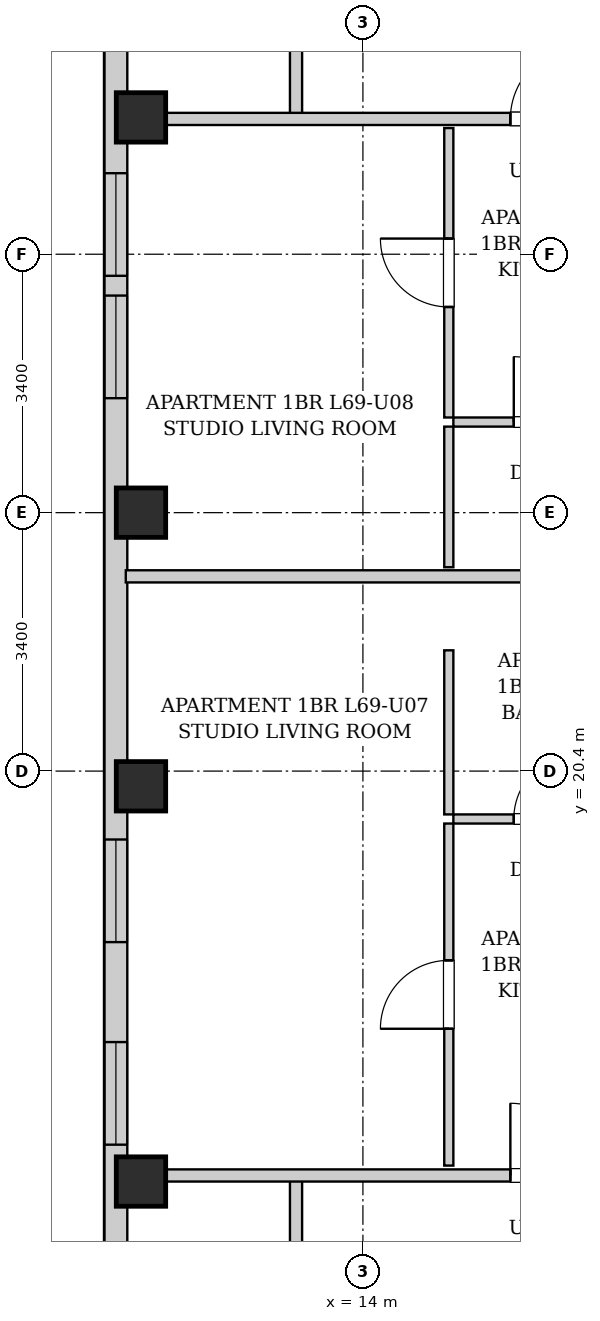
"""IFC4 building model, lengths in metres.
Left out: names, types, materials, properties, quantities, classifications, styles, units other than length and angle.
Written with IfcOpenShell. Run it as: python <this file> out.ifc"""

import sys

from ifc_helpers import new_model, si_unit, direction, frame, frame_2d, origin, origin_2d, place, context, subcontext, project, spatial, rectangle, extrude, element, fill, save


model = new_model("IFC4")
c1 = context("Model", 3, precision=1e-05, world=origin(), true_north=direction((0.0, 1.0)))
c2 = subcontext(c1, "Body", "Model", "MODEL_VIEW")
j1 = project(units=[si_unit("LENGTHUNIT", "METRE"), si_unit("PLANEANGLEUNIT", "RADIAN")], contexts=[c1])
p1 = place(None, origin())
s1 = spatial("IfcSite", under=j1, at=p1, CompositionType="ELEMENT")
p2 = place(p1, origin())
s2 = spatial("IfcBuilding", under=s1, at=p2, CompositionType="ELEMENT")
p3 = place(p2, frame((0.0, 0.0, 237.7)))
s3 = spatial("IfcBuildingStorey", under=s2, at=p3, CompositionType="ELEMENT", Elevation=237.7)
for number, where, z_axis, x_axis in (
    (1, (11.08, 15.0, 0.0), (0.0, 0.0, 1.0), (1.0, 0.0, 0.0)),
    (2, (11.08, 20.2, 0.0), (0.0, 0.0, 1.0), (1.0, 0.0, 0.0)),
    (3, (11.08, 23.8, 0.0), (0.0, 0.0, 1.0), (1.0, 0.0, 0.0)),
    (4, (11.08, 29.0, 0.0), (0.0, 0.0, 1.0), (1.0, 0.0, 0.0)),
):
    element("IfcColumn", number, at=place(p3, frame(where, z_axis=z_axis, x_axis=x_axis)), inside=s3, PredefinedType="COLUMN", context=c2, shape_type="SweptSolid", body=[
        extrude(rectangle(XDim=0.65, YDim=0.65, at=origin_2d()), origin(), (0.0, 0.0, 1.0), 3.4),
    ])
p4 = place(p3, frame((10.75, 6.3, 0.0), z_axis=(0.0, 0.0, 1.0), x_axis=(0.0, 1.0, 0.0)))
e5 = element("IfcWall", 5, at=p4, inside=s3, PredefinedType="SOLIDWALL", context=c2, shape_type="SweptSolid", body=[
    extrude(rectangle(XDim=31.4, YDim=0.3, at=frame_2d((15.7, 0.0))), origin(), (0.0, 0.0, 1.0), 3.14),
])
p5 = place(p4, frame((28.546, 0.0, 0.55)))
e6 = element("IfcOpeningElement", 6, at=p5, cuts=e5, PredefinedType="OPENING", context=c2, shape_type="SweptSolid", body=[
    extrude(rectangle(XDim=1.35, YDim=1.2, at=frame_2d((0.675, 0.6))), frame((0.0, 0.16, 0.0), z_axis=(0.0, -1.0, 0.0), x_axis=(1.0, 0.0, 0.0)), (0.0, 0.0, 1.0), 0.32),
])
p6 = place(p4, frame((11.85, 0.0, 0.55)))
e7 = element("IfcOpeningElement", 7, at=p6, cuts=e5, PredefinedType="OPENING", context=c2, shape_type="SweptSolid", body=[
    extrude(rectangle(XDim=1.35, YDim=1.2, at=frame_2d((0.675, 0.6))), frame((0.0, 0.16, 0.0), z_axis=(0.0, -1.0, 0.0), x_axis=(1.0, 0.0, 0.0)), (0.0, 0.0, 1.0), 0.32),
])
p7 = place(p4, frame((9.185, 0.0, 0.55)))
e8 = element("IfcOpeningElement", 8, at=p7, cuts=e5, PredefinedType="OPENING", context=c2, shape_type="SweptSolid", body=[
    extrude(rectangle(XDim=1.35, YDim=1.2, at=frame_2d((0.675, 0.6))), frame((0.0, 0.16, 0.0), z_axis=(0.0, -1.0, 0.0), x_axis=(1.0, 0.0, 0.0)), (0.0, 0.0, 1.0), 0.32),
])
p8 = place(p4, frame((19.006, 0.0, 0.55)))
e9 = element("IfcOpeningElement", 9, at=p8, cuts=e5, PredefinedType="OPENING", context=c2, shape_type="SweptSolid", body=[
    extrude(rectangle(XDim=1.35, YDim=1.2, at=frame_2d((0.675, 0.6))), frame((0.0, 0.16, 0.0), z_axis=(0.0, -1.0, 0.0), x_axis=(1.0, 0.0, 0.0)), (0.0, 0.0, 1.0), 0.32),
])
p9 = place(p4, frame((20.616, 0.0, 0.55)))
e10 = element("IfcOpeningElement", 10, at=p9, cuts=e5, PredefinedType="OPENING", context=c2, shape_type="SweptSolid", body=[
    extrude(rectangle(XDim=1.35, YDim=1.2, at=frame_2d((0.675, 0.6))), frame((0.0, 0.16, 0.0), z_axis=(0.0, -1.0, 0.0), x_axis=(1.0, 0.0, 0.0)), (0.0, 0.0, 1.0), 0.32),
])
for number, where, z_axis, x_axis in (
    (11, (13.12, 13.51, 0.0), (0.0, 0.0, 1.0), (0.0, 1.0, 0.0)),
    (12, (13.12, 28.98, 0.0), (0.0, 0.0, 1.0), (0.0, 1.0, 0.0)),
):
    element("IfcWall", number, at=place(p3, frame(where, z_axis=z_axis, x_axis=x_axis)), inside=s3, PredefinedType="PARTITIONING", context=c2, shape_type="SweptSolid", body=[
        extrude(rectangle(XDim=1.58, YDim=0.16, at=frame_2d((0.79, 0.0))), origin(), (0.0, 0.0, 1.0), 3.14),
    ])
p10 = place(p3, frame((10.88, 15.08, 0.0), z_axis=(0.0, 0.0, 1.0), x_axis=(1.0, 0.0, 0.0)))
e13 = element("IfcWall", 13, at=p10, inside=s3, PredefinedType="PARTITIONING", context=c2, shape_type="SweptSolid", body=[
    extrude(rectangle(XDim=6.88, YDim=0.16, at=frame_2d((3.44, 0.0))), origin(), (0.0, 0.0, 1.0), 2.668),
])
p11 = place(p10, frame((5.06, 0.0, 0.0)))
e14 = element("IfcOpeningElement", 14, at=p11, cuts=e13, PredefinedType="OPENING", context=c2, shape_type="SweptSolid", body=[
    extrude(rectangle(XDim=0.95, YDim=2.1, at=frame_2d((0.475, 1.05))), frame((0.0, 0.09, 0.0), z_axis=(0.0, -1.0, 0.0), x_axis=(1.0, 0.0, 0.0)), (0.0, 0.0, 1.0), 0.18),
])
p12 = place(p3, frame((10.88, 22.962, 0.0), z_axis=(0.0, 0.0, 1.0), x_axis=(1.0, 0.0, 0.0)))
e15 = element("IfcWall", 15, at=p12, inside=s3, PredefinedType="PARTITIONING", context=c2, shape_type="SweptSolid", body=[
    extrude(rectangle(XDim=6.76, YDim=0.16, at=frame_2d((3.38, 0.0))), origin(), (0.0, 0.0, 1.0), 3.14),
])
p13 = place(p3, frame((15.19, 19.77, 0.0), z_axis=(0.0, 0.0, 1.0), x_axis=(1.0, 0.0, 0.0)))
e16 = element("IfcWall", 16, at=p13, inside=s3, PredefinedType="PARTITIONING", context=c2, shape_type="SweptSolid", body=[
    extrude(rectangle(XDim=2.45, YDim=0.12, at=frame_2d((1.225, 0.0))), origin(), (0.0, 0.0, 1.0), 3.14),
])
p14 = place(p13, frame((0.795, 0.0, 0.0)))
e17 = element("IfcOpeningElement", 17, at=p14, cuts=e16, PredefinedType="OPENING", context=c2, shape_type="SweptSolid", body=[
    extrude(rectangle(XDim=0.86, YDim=2.05, at=frame_2d((0.43, 1.025))), frame((0.0, 0.07, 0.0), z_axis=(0.0, -1.0, 0.0), x_axis=(1.0, 0.0, 0.0)), (0.0, 0.0, 1.0), 0.14),
])
p15 = place(p3, frame((15.13, 19.83, 0.0), z_axis=(0.0, 0.0, 1.0), x_axis=(0.0, 1.0, 0.0)))
e18 = element("IfcWall", 18, at=p15, inside=s3, PredefinedType="PARTITIONING", context=c2, shape_type="SweptSolid", body=[
    extrude(rectangle(XDim=2.159, YDim=0.12, at=frame_2d((1.08, 0.0))), origin(), (0.0, 0.0, 1.0), 3.14),
])
p16 = place(p3, frame((15.13, 15.21, 0.0), z_axis=(0.0, 0.0, 1.0), x_axis=(0.0, 1.0, 0.0)))
e19 = element("IfcWall", 19, at=p16, inside=s3, PredefinedType="PARTITIONING", context=c2, shape_type="SweptSolid", body=[
    extrude(rectangle(XDim=4.5, YDim=0.12, at=frame_2d((2.25, 0.0))), origin(), (0.0, 0.0, 1.0), 3.14),
])
p17 = place(p16, frame((1.8, 0.0, 0.0)))
e20 = element("IfcOpeningElement", 20, at=p17, cuts=e19, PredefinedType="OPENING", context=c2, shape_type="SweptSolid", body=[
    extrude(rectangle(XDim=0.9, YDim=2.05, at=frame_2d((0.45, 1.025))), frame((0.0, 0.07, 0.0), z_axis=(0.0, -1.0, 0.0), x_axis=(1.0, 0.0, 0.0)), (0.0, 0.0, 1.0), 0.14),
])
p18 = place(p3, frame((10.88, 28.98, 0.0), z_axis=(0.0, 0.0, 1.0), x_axis=(1.0, 0.0, 0.0)))
e21 = element("IfcWall", 21, at=p18, inside=s3, PredefinedType="PARTITIONING", context=c2, shape_type="SweptSolid", body=[
    extrude(rectangle(XDim=6.88, YDim=0.16, at=frame_2d((3.44, 0.0))), origin(), (0.0, 0.0, 1.0), 2.668),
])
p19 = place(p18, frame((5.06, 0.0, 0.0)))
e22 = element("IfcOpeningElement", 22, at=p19, cuts=e21, PredefinedType="OPENING", context=c2, shape_type="SweptSolid", body=[
    extrude(rectangle(XDim=0.95, YDim=2.1, at=frame_2d((0.475, 1.05))), frame((0.0, 0.09, 0.0), z_axis=(0.0, -1.0, 0.0), x_axis=(1.0, 0.0, 0.0)), (0.0, 0.0, 1.0), 0.18),
])
p20 = place(p3, frame((15.19, 24.992, 0.0), z_axis=(0.0, 0.0, 1.0), x_axis=(1.0, 0.0, 0.0)))
e23 = element("IfcWall", 23, at=p20, inside=s3, PredefinedType="PARTITIONING", context=c2, shape_type="SweptSolid", body=[
    extrude(rectangle(XDim=2.45, YDim=0.12, at=frame_2d((1.225, 0.0))), origin(), (0.0, 0.0, 1.0), 3.14),
])
p21 = place(p20, frame((0.795, 0.0, 0.0)))
e24 = element("IfcOpeningElement", 24, at=p21, cuts=e23, PredefinedType="OPENING", context=c2, shape_type="SweptSolid", body=[
    extrude(rectangle(XDim=0.86, YDim=2.05, at=frame_2d((0.43, 1.025))), frame((0.0, 0.07, 0.0), z_axis=(0.0, -1.0, 0.0), x_axis=(1.0, 0.0, 0.0)), (0.0, 0.0, 1.0), 0.14),
])
p22 = place(p3, frame((15.13, 23.082, 0.0), z_axis=(0.0, 0.0, 1.0), x_axis=(0.0, 1.0, 0.0)))
e25 = element("IfcWall", 25, at=p22, inside=s3, PredefinedType="PARTITIONING", context=c2, shape_type="SweptSolid", body=[
    extrude(rectangle(XDim=1.85, YDim=0.12, at=frame_2d((0.925, 0.0))), origin(), (0.0, 0.0, 1.0), 3.14),
])
p23 = place(p3, frame((15.13, 25.052, 0.0), z_axis=(0.0, 0.0, 1.0), x_axis=(0.0, 1.0, 0.0)))
e26 = element("IfcWall", 26, at=p23, inside=s3, PredefinedType="PARTITIONING", context=c2, shape_type="SweptSolid", body=[
    extrude(rectangle(XDim=3.808, YDim=0.12, at=frame_2d((1.904, 0.0))), origin(), (0.0, 0.0, 1.0), 3.14),
])
p24 = place(p23, frame((1.454, 0.0, 0.0)))
e27 = element("IfcOpeningElement", 27, at=p24, cuts=e26, PredefinedType="OPENING", context=c2, shape_type="SweptSolid", body=[
    extrude(rectangle(XDim=0.9, YDim=2.05, at=frame_2d((0.45, 1.025))), frame((0.0, 0.07, 0.0), z_axis=(0.0, -1.0, 0.0), x_axis=(1.0, 0.0, 0.0)), (0.0, 0.0, 1.0), 0.14),
])
p25 = place(p11, origin())
e28 = element("IfcDoor", 28, at=p25, inside=s3, OperationType="SINGLE_SWING_LEFT", PredefinedType="DOOR", context=c2, shape_type="SweptSolid", body=[
    extrude(rectangle(XDim=0.95, YDim=2.1, at=frame_2d((0.475, 1.05))), frame((0.0, 0.025, 0.0), z_axis=(0.0, -1.0, 0.0), x_axis=(1.0, 0.0, 0.0)), (0.0, 0.0, 1.0), 0.05),
])
fill(e14, e28)
p26 = place(p14, origin())
e29 = element("IfcDoor", 29, at=p26, inside=s3, OperationType="SINGLE_SWING_RIGHT", PredefinedType="DOOR", context=c2, shape_type="SweptSolid", body=[
    extrude(rectangle(XDim=0.86, YDim=2.05, at=frame_2d((0.43, 1.025))), frame((0.0, 0.025, 0.0), z_axis=(0.0, -1.0, 0.0), x_axis=(1.0, 0.0, 0.0)), (0.0, 0.0, 1.0), 0.05),
])
fill(e17, e29)
p27 = place(p17, origin())
e30 = element("IfcDoor", 30, at=p27, inside=s3, OperationType="SINGLE_SWING_LEFT", PredefinedType="DOOR", context=c2, shape_type="SweptSolid", body=[
    extrude(rectangle(XDim=0.9, YDim=2.05, at=frame_2d((0.45, 1.025))), frame((0.0, 0.025, 0.0), z_axis=(0.0, -1.0, 0.0), x_axis=(1.0, 0.0, 0.0)), (0.0, 0.0, 1.0), 0.05),
])
fill(e20, e30)
p28 = place(p19, origin())
e31 = element("IfcDoor", 31, at=p28, inside=s3, OperationType="SINGLE_SWING_RIGHT", PredefinedType="DOOR", context=c2, shape_type="SweptSolid", body=[
    extrude(rectangle(XDim=0.95, YDim=2.1, at=frame_2d((0.475, 1.05))), frame((0.0, 0.025, 0.0), z_axis=(0.0, -1.0, 0.0), x_axis=(1.0, 0.0, 0.0)), (0.0, 0.0, 1.0), 0.05),
])
fill(e22, e31)
p29 = place(p21, origin())
e32 = element("IfcDoor", 32, at=p29, inside=s3, OperationType="SINGLE_SWING_LEFT", PredefinedType="DOOR", context=c2, shape_type="SweptSolid", body=[
    extrude(rectangle(XDim=0.86, YDim=2.05, at=frame_2d((0.43, 1.025))), frame((0.0, 0.025, 0.0), z_axis=(0.0, -1.0, 0.0), x_axis=(1.0, 0.0, 0.0)), (0.0, 0.0, 1.0), 0.05),
])
fill(e24, e32)
p30 = place(p24, origin())
e33 = element("IfcDoor", 33, at=p30, inside=s3, OperationType="SINGLE_SWING_RIGHT", PredefinedType="DOOR", context=c2, shape_type="SweptSolid", body=[
    extrude(rectangle(XDim=0.9, YDim=2.05, at=frame_2d((0.45, 1.025))), frame((0.0, 0.025, 0.0), z_axis=(0.0, -1.0, 0.0), x_axis=(1.0, 0.0, 0.0)), (0.0, 0.0, 1.0), 0.05),
])
fill(e27, e33)
p31 = place(p6, origin())
e34 = element("IfcWindow", 34, at=p31, inside=s3, PartitioningType="SINGLE_PANEL", PredefinedType="WINDOW", context=c2, shape_type="SweptSolid", body=[
    extrude(rectangle(XDim=1.35, YDim=1.2, at=frame_2d((0.675, 0.6))), frame((0.0, 0.03, 0.0), z_axis=(0.0, -1.0, 0.0), x_axis=(1.0, 0.0, 0.0)), (0.0, 0.0, 1.0), 0.06),
])
fill(e7, e34)
p32 = place(p7, origin())
e35 = element("IfcWindow", 35, at=p32, inside=s3, PartitioningType="SINGLE_PANEL", PredefinedType="WINDOW", context=c2, shape_type="SweptSolid", body=[
    extrude(rectangle(XDim=1.35, YDim=1.2, at=frame_2d((0.675, 0.6))), frame((0.0, 0.03, 0.0), z_axis=(0.0, -1.0, 0.0), x_axis=(1.0, 0.0, 0.0)), (0.0, 0.0, 1.0), 0.06),
])
fill(e8, e35)
p33 = place(p8, origin())
e36 = element("IfcWindow", 36, at=p33, inside=s3, PartitioningType="SINGLE_PANEL", PredefinedType="WINDOW", context=c2, shape_type="SweptSolid", body=[
    extrude(rectangle(XDim=1.35, YDim=1.2, at=frame_2d((0.675, 0.6))), frame((0.0, 0.03, 0.0), z_axis=(0.0, -1.0, 0.0), x_axis=(1.0, 0.0, 0.0)), (0.0, 0.0, 1.0), 0.06),
])
fill(e9, e36)
p34 = place(p9, origin())
e37 = element("IfcWindow", 37, at=p34, inside=s3, PartitioningType="SINGLE_PANEL", PredefinedType="WINDOW", context=c2, shape_type="SweptSolid", body=[
    extrude(rectangle(XDim=1.35, YDim=1.2, at=frame_2d((0.675, 0.6))), frame((0.0, 0.03, 0.0), z_axis=(0.0, -1.0, 0.0), x_axis=(1.0, 0.0, 0.0)), (0.0, 0.0, 1.0), 0.06),
])
fill(e10, e37)
save(model, sys.argv[1])
